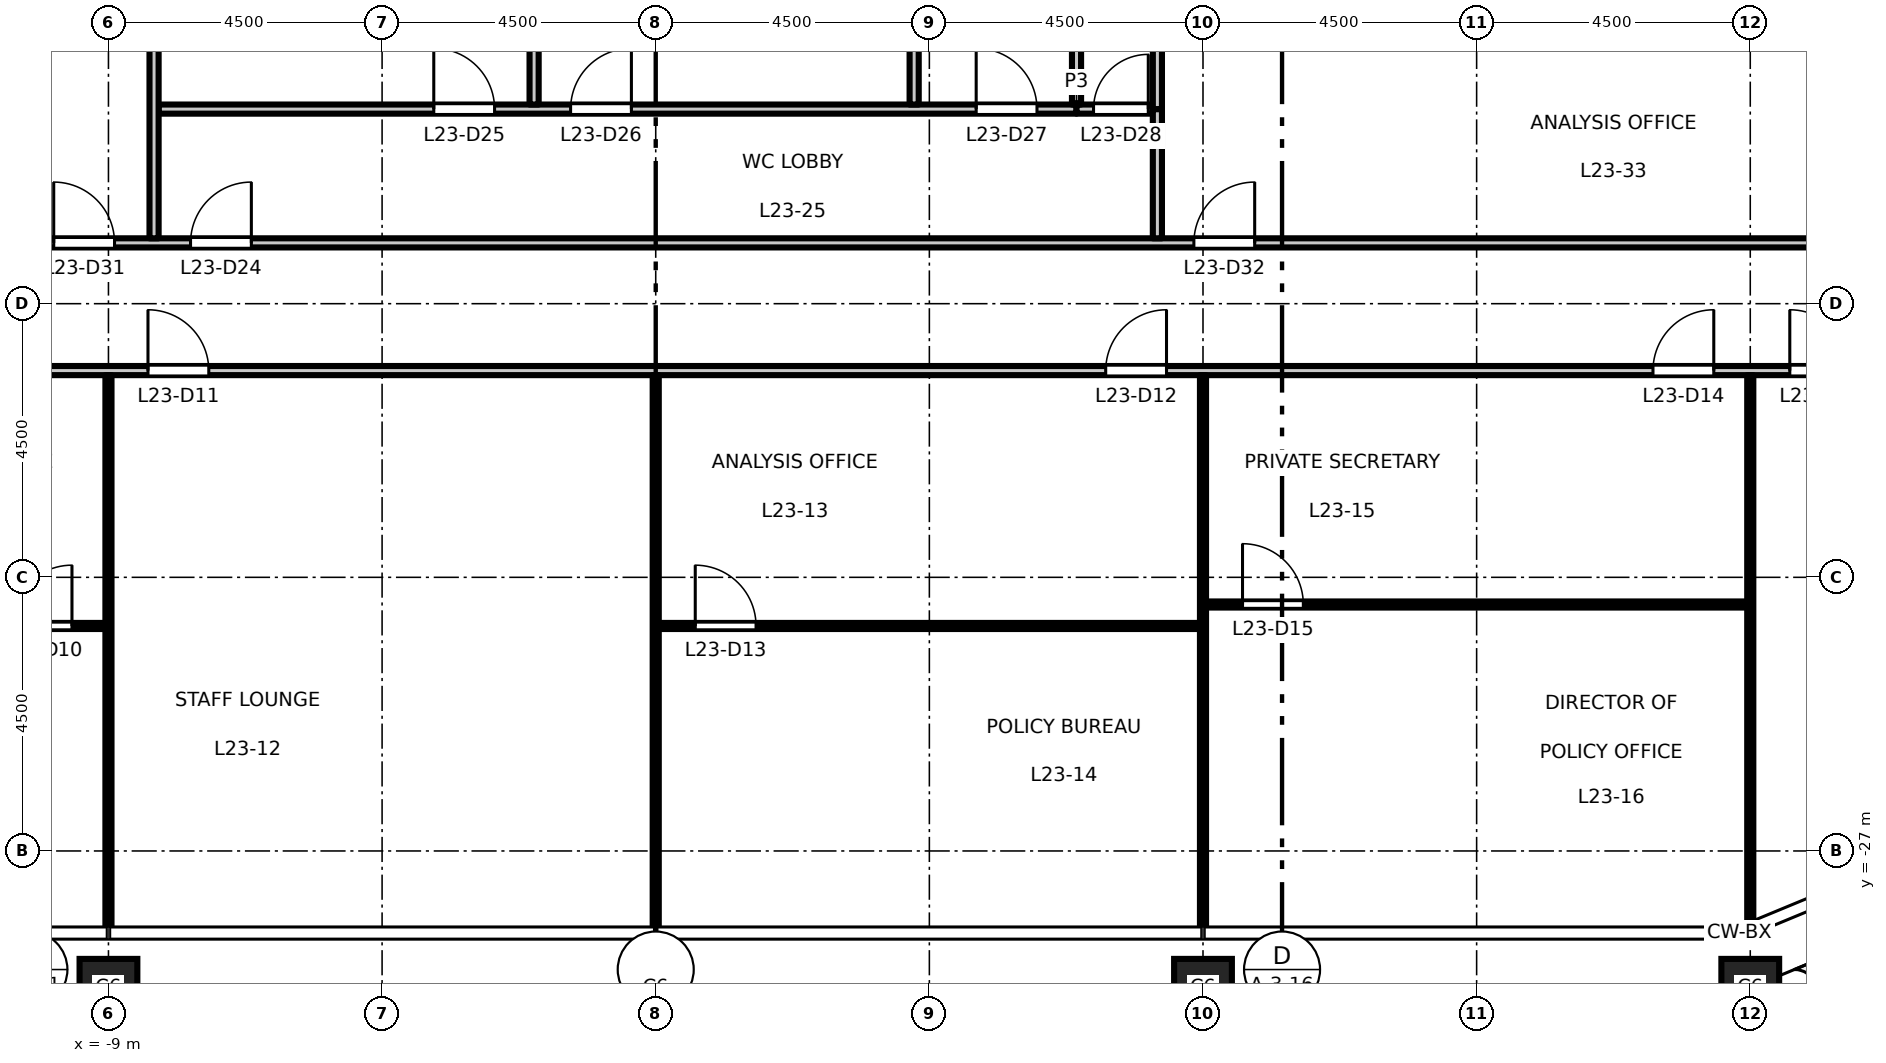
"""IFC4 building model, lengths in metres.
Left out: names, types, materials, properties, quantities, classifications, styles, units other than length and angle.
Written with IfcOpenShell. Run it as: python <this file> out.ifc"""

import sys

from ifc_helpers import new_model, si_unit, direction, frame, frame_2d, origin, origin_2d, place, context, subcontext, project, spatial, rectangle, hollow_rectangle, extrude, element, fill, save


model = new_model("IFC4")
c1 = context("Model", 3, precision=1e-05, world=origin(), true_north=direction((0.0, 1.0)))
c2 = subcontext(c1, "Body", "Model", "MODEL_VIEW")
j1 = project(units=[si_unit("LENGTHUNIT", "METRE"), si_unit("PLANEANGLEUNIT", "RADIAN")], contexts=[c1])
p1 = place(None, origin())
s1 = spatial("IfcSite", under=j1, at=p1, CompositionType="ELEMENT")
p2 = place(p1, origin())
s2 = spatial("IfcBuilding", under=s1, at=p2, CompositionType="ELEMENT")
p3 = place(p2, frame((0.0, 0.0, 109.2)))
s3 = spatial("IfcBuildingStorey", under=s2, at=p3, CompositionType="ELEMENT", Elevation=109.2)
for number, where, z_axis, x_axis in (
    (1, (-9.0, -29.25, 0.0), (0.0, 0.0, 1.0), (1.0, 0.0, 0.0)),
    (2, (0.0, -29.25, 0.0), (0.0, 0.0, 1.0), (1.0, 0.0, 0.0)),
    (3, (9.0, -29.25, 0.0), (0.0, 0.0, 1.0), (1.0, 0.0, 0.0)),
    (4, (18.0, -29.25, 0.0), (0.0, 0.0, 1.0), (1.0, 0.0, 0.0)),
):
    element("IfcColumn", number, at=place(p3, frame(where, z_axis=z_axis, x_axis=x_axis)), inside=s3, PredefinedType="COLUMN", context=c2, shape_type="SweptSolid", body=[
        extrude(hollow_rectangle(XDim=0.95, YDim=0.95, WallThickness=0.055, at=origin_2d()), origin(), (0.0, 0.0, 1.0), 4.5),
    ])
p4 = place(p3, frame((-17.95, -23.3, 0.0), z_axis=(0.0, 0.0, 1.0), x_axis=(1.0, 0.0, 0.0)))
e5 = element("IfcWall", 5, at=p4, inside=s3, PredefinedType="PARTITIONING", context=c2, shape_type="SweptSolid", body=[
    extrude(rectangle(XDim=8.9, YDim=0.1, at=frame_2d((4.45, 0.0))), origin(), (0.0, 0.0, 1.0), 4.35),
])
p5 = place(p4, frame((7.35, 0.0, 0.0)))
e6 = element("IfcOpeningElement", 6, at=p5, cuts=e5, PredefinedType="OPENING", context=c2, shape_type="SweptSolid", body=[
    extrude(rectangle(XDim=1.0, YDim=2.1, at=frame_2d((0.5, 1.05))), frame((0.0, 0.06, 0.0), z_axis=(0.0, -1.0, 0.0), x_axis=(1.0, 0.0, 0.0)), (0.0, 0.0, 1.0), 0.12),
])
p6 = place(p3, frame((0.05, -23.3, 0.0), z_axis=(0.0, 0.0, 1.0), x_axis=(1.0, 0.0, 0.0)))
e7 = element("IfcWall", 7, at=p6, inside=s3, PredefinedType="PARTITIONING", context=c2, shape_type="SweptSolid", body=[
    extrude(rectangle(XDim=8.9, YDim=0.1, at=frame_2d((4.45, 0.0))), origin(), (0.0, 0.0, 1.0), 4.35),
])
p7 = place(p6, frame((0.6, 0.0, 0.0)))
e8 = element("IfcOpeningElement", 8, at=p7, cuts=e7, PredefinedType="OPENING", context=c2, shape_type="SweptSolid", body=[
    extrude(rectangle(XDim=1.0, YDim=2.1, at=frame_2d((0.5, 1.05))), frame((0.0, 0.06, 0.0), z_axis=(0.0, -1.0, 0.0), x_axis=(1.0, 0.0, 0.0)), (0.0, 0.0, 1.0), 0.12),
])
p8 = place(p3, frame((9.05, -22.947, 0.0), z_axis=(0.0, 0.0, 1.0), x_axis=(1.0, 0.0, 0.0)))
e9 = element("IfcWall", 9, at=p8, inside=s3, PredefinedType="PARTITIONING", context=c2, shape_type="SweptSolid", body=[
    extrude(rectangle(XDim=8.9, YDim=0.1, at=frame_2d((4.45, 0.0))), origin(), (0.0, 0.0, 1.0), 4.35),
])
p9 = place(p8, frame((0.6, 0.0, 0.0)))
e10 = element("IfcOpeningElement", 10, at=p9, cuts=e9, PredefinedType="OPENING", context=c2, shape_type="SweptSolid", body=[
    extrude(rectangle(XDim=1.0, YDim=2.1, at=frame_2d((0.5, 1.05))), frame((0.0, 0.06, 0.0), z_axis=(0.0, -1.0, 0.0), x_axis=(1.0, 0.0, 0.0)), (0.0, 0.0, 1.0), 0.12),
])
p10 = place(p3, frame((-27.723, -19.1, 0.0), z_axis=(0.0, 0.0, 1.0), x_axis=(1.0, 0.0, 0.0)))
e11 = element("IfcWall", 11, at=p10, inside=s3, PredefinedType="PARTITIONING", context=c2, shape_type="SweptSolid", body=[
    extrude(rectangle(XDim=55.446, YDim=0.15, at=frame_2d((27.723, 0.0))), origin(), (0.0, 0.0, 1.0), 4.35),
])
p11 = place(p10, frame((10.373, 0.0, 0.0)))
e12 = element("IfcOpeningElement", 12, at=p11, cuts=e11, PredefinedType="OPENING", context=c2, shape_type="SweptSolid", body=[
    extrude(rectangle(XDim=1.0, YDim=2.1, at=frame_2d((0.5, 1.05))), frame((0.0, 0.085, 0.0), z_axis=(0.0, -1.0, 0.0), x_axis=(1.0, 0.0, 0.0)), (0.0, 0.0, 1.0), 0.17),
])
p12 = place(p10, frame((19.373, 0.0, 0.0)))
e13 = element("IfcOpeningElement", 13, at=p12, cuts=e11, PredefinedType="OPENING", context=c2, shape_type="SweptSolid", body=[
    extrude(rectangle(XDim=1.0, YDim=2.1, at=frame_2d((0.5, 1.05))), frame((0.0, 0.085, 0.0), z_axis=(0.0, -1.0, 0.0), x_axis=(1.0, 0.0, 0.0)), (0.0, 0.0, 1.0), 0.17),
])
p13 = place(p10, frame((35.123, 0.0, 0.0)))
e14 = element("IfcOpeningElement", 14, at=p13, cuts=e11, PredefinedType="OPENING", context=c2, shape_type="SweptSolid", body=[
    extrude(rectangle(XDim=1.0, YDim=2.1, at=frame_2d((0.5, 1.05))), frame((0.0, 0.085, 0.0), z_axis=(0.0, -1.0, 0.0), x_axis=(1.0, 0.0, 0.0)), (0.0, 0.0, 1.0), 0.17),
])
p14 = place(p10, frame((44.123, 0.0, 0.0)))
e15 = element("IfcOpeningElement", 15, at=p14, cuts=e11, PredefinedType="OPENING", context=c2, shape_type="SweptSolid", body=[
    extrude(rectangle(XDim=1.0, YDim=2.1, at=frame_2d((0.5, 1.05))), frame((0.0, 0.085, 0.0), z_axis=(0.0, -1.0, 0.0), x_axis=(1.0, 0.0, 0.0)), (0.0, 0.0, 1.0), 0.17),
])
p15 = place(p10, frame((0.65, 0.0, 0.0)))
e16 = element("IfcOpeningElement", 16, at=p15, cuts=e11, PredefinedType="OPENING", context=c2, shape_type="SweptSolid", body=[
    extrude(rectangle(XDim=1.0, YDim=2.1, at=frame_2d((0.5, 1.05))), frame((0.0, 0.085, 0.0), z_axis=(0.0, -1.0, 0.0), x_axis=(1.0, 0.0, 0.0)), (0.0, 0.0, 1.0), 0.17),
])
p16 = place(p10, frame((46.373, 0.0, 0.0)))
e17 = element("IfcOpeningElement", 17, at=p16, cuts=e11, PredefinedType="OPENING", context=c2, shape_type="SweptSolid", body=[
    extrude(rectangle(XDim=1.0, YDim=2.1, at=frame_2d((0.5, 1.05))), frame((0.0, 0.085, 0.0), z_axis=(0.0, -1.0, 0.0), x_axis=(1.0, 0.0, 0.0)), (0.0, 0.0, 1.0), 0.17),
])
p17 = place(p3, frame((-21.825, -17.0, 0.0), z_axis=(0.0, 0.0, 1.0), x_axis=(1.0, 0.0, 0.0)))
e18 = element("IfcWall", 18, at=p17, inside=s3, PredefinedType="PARTITIONING", context=c2, shape_type="SweptSolid", body=[
    extrude(rectangle(XDim=43.65, YDim=0.15, at=frame_2d((21.825, 0.0))), origin(), (0.0, 0.0, 1.0), 4.35),
])
p18 = place(p17, frame((14.175, 0.0, 0.0)))
e19 = element("IfcOpeningElement", 19, at=p18, cuts=e18, PredefinedType="OPENING", context=c2, shape_type="SweptSolid", body=[
    extrude(rectangle(XDim=1.0, YDim=2.1, at=frame_2d((0.5, 1.05))), frame((0.0, 0.085, 0.0), z_axis=(0.0, -1.0, 0.0), x_axis=(1.0, 0.0, 0.0)), (0.0, 0.0, 1.0), 0.17),
])
p19 = place(p17, frame((11.925, 0.0, 0.0)))
e20 = element("IfcOpeningElement", 20, at=p19, cuts=e18, PredefinedType="OPENING", context=c2, shape_type="SweptSolid", body=[
    extrude(rectangle(XDim=1.0, YDim=2.1, at=frame_2d((0.5, 1.05))), frame((0.0, 0.085, 0.0), z_axis=(0.0, -1.0, 0.0), x_axis=(1.0, 0.0, 0.0)), (0.0, 0.0, 1.0), 0.17),
])
p20 = place(p17, frame((30.675, 0.0, 0.0)))
e21 = element("IfcOpeningElement", 21, at=p20, cuts=e18, PredefinedType="OPENING", context=c2, shape_type="SweptSolid", body=[
    extrude(rectangle(XDim=1.0, YDim=2.1, at=frame_2d((0.5, 1.05))), frame((0.0, 0.085, 0.0), z_axis=(0.0, -1.0, 0.0), x_axis=(1.0, 0.0, 0.0)), (0.0, 0.0, 1.0), 0.17),
])
p21 = place(p3, frame((-8.175, -14.8, 0.0), z_axis=(0.0, 0.0, 1.0), x_axis=(1.0, 0.0, 0.0)))
e22 = element("IfcWall", 22, at=p21, inside=s3, PredefinedType="PARTITIONING", context=c2, shape_type="SweptSolid", body=[
    extrude(rectangle(XDim=15.095, YDim=0.15, at=frame_2d((7.547, 0.0))), origin(), (0.0, 0.0, 1.0), 4.35),
])
p22 = place(p21, frame((4.525, 0.0, 0.0)))
e23 = element("IfcOpeningElement", 23, at=p22, cuts=e22, PredefinedType="OPENING", context=c2, shape_type="SweptSolid", body=[
    extrude(rectangle(XDim=1.0, YDim=2.1, at=frame_2d((0.5, 1.05))), frame((0.0, 0.085, 0.0), z_axis=(0.0, -1.0, 0.0), x_axis=(1.0, 0.0, 0.0)), (0.0, 0.0, 1.0), 0.17),
])
p23 = place(p21, frame((6.775, 0.0, 0.0)))
e24 = element("IfcOpeningElement", 24, at=p23, cuts=e22, PredefinedType="OPENING", context=c2, shape_type="SweptSolid", body=[
    extrude(rectangle(XDim=1.0, YDim=2.1, at=frame_2d((0.5, 1.05))), frame((0.0, 0.085, 0.0), z_axis=(0.0, -1.0, 0.0), x_axis=(1.0, 0.0, 0.0)), (0.0, 0.0, 1.0), 0.17),
])
p24 = place(p21, frame((13.445, 0.0, 0.0)))
e25 = element("IfcOpeningElement", 25, at=p24, cuts=e22, PredefinedType="OPENING", context=c2, shape_type="SweptSolid", body=[
    extrude(rectangle(XDim=1.0, YDim=2.1, at=frame_2d((0.5, 1.05))), frame((0.0, 0.085, 0.0), z_axis=(0.0, -1.0, 0.0), x_axis=(1.0, 0.0, 0.0)), (0.0, 0.0, 1.0), 0.17),
])
p25 = place(p3, frame((6.92, -14.8, 0.0), z_axis=(0.0, 0.0, 1.0), x_axis=(1.0, 0.0, 0.0)))
e26 = element("IfcWall", 26, at=p25, inside=s3, PredefinedType="PARTITIONING", context=c2, shape_type="SweptSolid", body=[
    extrude(rectangle(XDim=1.255, YDim=0.15, at=frame_2d((0.627, 0.0))), origin(), (0.0, 0.0, 1.0), 4.35),
])
p26 = place(p25, frame((0.28, 0.0, 0.0)))
e27 = element("IfcOpeningElement", 27, at=p26, cuts=e26, PredefinedType="OPENING", context=c2, shape_type="SweptSolid", body=[
    extrude(rectangle(XDim=0.9, YDim=2.1, at=frame_2d((0.45, 1.05))), frame((0.0, 0.085, 0.0), z_axis=(0.0, -1.0, 0.0), x_axis=(1.0, 0.0, 0.0)), (0.0, 0.0, 1.0), 0.17),
])
p27 = place(p3, frame((-9.0, -28.26, 0.0), z_axis=(0.0, 0.0, 1.0), x_axis=(0.0, 1.0, 0.0)))
e28 = element("IfcWall", 28, at=p27, inside=s3, PredefinedType="PARTITIONING", context=c2, shape_type="SweptSolid", body=[
    extrude(rectangle(XDim=9.085, YDim=0.1, at=frame_2d((4.542, 0.0))), origin(), (0.0, 0.0, 1.0), 3.45),
])
p28 = place(p3, frame((-8.25, -16.925, 0.0), z_axis=(0.0, 0.0, 1.0), x_axis=(0.0, 1.0, 0.0)))
e29 = element("IfcWall", 29, at=p28, inside=s3, PredefinedType="PARTITIONING", context=c2, shape_type="SweptSolid", body=[
    extrude(rectangle(XDim=3.425, YDim=0.15, at=frame_2d((1.712, 0.0))), origin(), (0.0, 0.0, 1.0), 4.35),
])
p29 = place(p3, frame((-2.0, -14.725, 0.0), z_axis=(0.0, 0.0, 1.0), x_axis=(0.0, 1.0, 0.0)))
e30 = element("IfcWall", 30, at=p29, inside=s3, PredefinedType="PARTITIONING", context=c2, shape_type="SweptSolid", body=[
    extrude(rectangle(XDim=6.355, YDim=0.15, at=frame_2d((3.177, 0.0))), origin(), (0.0, 0.0, 1.0), 4.35),
])
p30 = place(p3, frame((0.0, -28.26, 0.0), z_axis=(0.0, 0.0, 1.0), x_axis=(0.0, 1.0, 0.0)))
e31 = element("IfcWall", 31, at=p30, inside=s3, PredefinedType="PARTITIONING", context=c2, shape_type="SweptSolid", body=[
    extrude(rectangle(XDim=9.085, YDim=0.1, at=frame_2d((4.542, 0.0))), origin(), (0.0, 0.0, 1.0), 3.45),
])
p31 = place(p3, frame((4.25, -14.725, 0.0), z_axis=(0.0, 0.0, 1.0), x_axis=(0.0, 1.0, 0.0)))
e32 = element("IfcWall", 32, at=p31, inside=s3, PredefinedType="PARTITIONING", context=c2, shape_type="SweptSolid", body=[
    extrude(rectangle(XDim=6.355, YDim=0.15, at=frame_2d((3.177, 0.0))), origin(), (0.0, 0.0, 1.0), 4.35),
])
p32 = place(p3, frame((6.92, -14.725, 0.0), z_axis=(0.0, 0.0, 1.0), x_axis=(0.0, 1.0, 0.0)))
e33 = element("IfcWall", 33, at=p32, inside=s3, PredefinedType="PARTITIONING", context=c2, shape_type="SweptSolid", body=[
    extrude(rectangle(XDim=6.7, YDim=0.15, at=frame_2d((3.35, 0.0))), origin(), (0.0, 0.0, 1.0), 4.35),
])
p33 = place(p3, frame((8.25, -16.925, 0.0), z_axis=(0.0, 0.0, 1.0), x_axis=(0.0, 1.0, 0.0)))
e34 = element("IfcWall", 34, at=p33, inside=s3, PredefinedType="PARTITIONING", context=c2, shape_type="SweptSolid", body=[
    extrude(rectangle(XDim=2.125, YDim=0.15, at=frame_2d((1.062, 0.0))), origin(), (0.0, 0.0, 1.0), 4.35),
])
p34 = place(p3, frame((8.25, -14.8, 0.0), z_axis=(0.0, 0.0, 1.0), x_axis=(0.0, 1.0, 0.0)))
e35 = element("IfcWall", 35, at=p34, inside=s3, PredefinedType="PARTITIONING", context=c2, shape_type="SweptSolid", body=[
    extrude(rectangle(XDim=1.3, YDim=0.15, at=frame_2d((0.65, 0.0))), origin(), (0.0, 0.0, 1.0), 4.35),
])
p35 = place(p3, frame((9.0, -28.26, 0.0), z_axis=(0.0, 0.0, 1.0), x_axis=(0.0, 1.0, 0.0)))
e36 = element("IfcWall", 36, at=p35, inside=s3, PredefinedType="PARTITIONING", context=c2, shape_type="SweptSolid", body=[
    extrude(rectangle(XDim=9.085, YDim=0.1, at=frame_2d((4.542, 0.0))), origin(), (0.0, 0.0, 1.0), 3.45),
])
p36 = place(p3, frame((18.0, -28.178, 0.0), z_axis=(0.0, 0.0, 1.0), x_axis=(0.0, 1.0, 0.0)))
e37 = element("IfcWall", 37, at=p36, inside=s3, PredefinedType="PARTITIONING", context=c2, shape_type="SweptSolid", body=[
    extrude(rectangle(XDim=9.003, YDim=0.1, at=frame_2d((4.501, 0.0))), origin(), (0.0, 0.0, 1.0), 3.45),
])
p37 = place(p5, origin())
e38 = element("IfcDoor", 38, at=p37, inside=s3, OperationType="SINGLE_SWING_RIGHT", PredefinedType="DOOR", context=c2, shape_type="SweptSolid", body=[
    extrude(rectangle(XDim=1.0, YDim=2.1, at=frame_2d((0.5, 1.05))), frame((0.0, 0.025, 0.0), z_axis=(0.0, -1.0, 0.0), x_axis=(1.0, 0.0, 0.0)), (0.0, 0.0, 1.0), 0.05),
])
fill(e6, e38)
p38 = place(p12, origin())
e39 = element("IfcDoor", 39, at=p38, inside=s3, OperationType="SINGLE_SWING_LEFT", PredefinedType="DOOR", context=c2, shape_type="SweptSolid", body=[
    extrude(rectangle(XDim=1.0, YDim=2.1, at=frame_2d((0.5, 1.05))), frame((0.0, 0.025, 0.0), z_axis=(0.0, -1.0, 0.0), x_axis=(1.0, 0.0, 0.0)), (0.0, 0.0, 1.0), 0.05),
])
fill(e13, e39)
p39 = place(p13, origin())
e40 = element("IfcDoor", 40, at=p39, inside=s3, OperationType="SINGLE_SWING_RIGHT", PredefinedType="DOOR", context=c2, shape_type="SweptSolid", body=[
    extrude(rectangle(XDim=1.0, YDim=2.1, at=frame_2d((0.5, 1.05))), frame((0.0, 0.025, 0.0), z_axis=(0.0, -1.0, 0.0), x_axis=(1.0, 0.0, 0.0)), (0.0, 0.0, 1.0), 0.05),
])
fill(e14, e40)
p40 = place(p7, origin())
e41 = element("IfcDoor", 41, at=p40, inside=s3, OperationType="SINGLE_SWING_LEFT", PredefinedType="DOOR", context=c2, shape_type="SweptSolid", body=[
    extrude(rectangle(XDim=1.0, YDim=2.1, at=frame_2d((0.5, 1.05))), frame((0.0, 0.025, 0.0), z_axis=(0.0, -1.0, 0.0), x_axis=(1.0, 0.0, 0.0)), (0.0, 0.0, 1.0), 0.05),
])
fill(e8, e41)
p41 = place(p14, origin())
e42 = element("IfcDoor", 42, at=p41, inside=s3, OperationType="SINGLE_SWING_RIGHT", PredefinedType="DOOR", context=c2, shape_type="SweptSolid", body=[
    extrude(rectangle(XDim=1.0, YDim=2.1, at=frame_2d((0.5, 1.05))), frame((0.0, 0.025, 0.0), z_axis=(0.0, -1.0, 0.0), x_axis=(1.0, 0.0, 0.0)), (0.0, 0.0, 1.0), 0.05),
])
fill(e15, e42)
p42 = place(p9, origin())
e43 = element("IfcDoor", 43, at=p42, inside=s3, OperationType="SINGLE_SWING_LEFT", PredefinedType="DOOR", context=c2, shape_type="SweptSolid", body=[
    extrude(rectangle(XDim=1.0, YDim=2.1, at=frame_2d((0.5, 1.05))), frame((0.0, 0.025, 0.0), z_axis=(0.0, -1.0, 0.0), x_axis=(1.0, 0.0, 0.0)), (0.0, 0.0, 1.0), 0.05),
])
fill(e10, e43)
p43 = place(p16, origin())
e44 = element("IfcDoor", 44, at=p43, inside=s3, OperationType="SINGLE_SWING_LEFT", PredefinedType="DOOR", context=c2, shape_type="SweptSolid", body=[
    extrude(rectangle(XDim=1.0, YDim=2.1, at=frame_2d((0.5, 1.05))), frame((0.0, 0.025, 0.0), z_axis=(0.0, -1.0, 0.0), x_axis=(1.0, 0.0, 0.0)), (0.0, 0.0, 1.0), 0.05),
])
fill(e17, e44)
p44 = place(p18, origin())
e45 = element("IfcDoor", 45, at=p44, inside=s3, OperationType="SINGLE_SWING_RIGHT", PredefinedType="DOOR", context=c2, shape_type="SweptSolid", body=[
    extrude(rectangle(XDim=1.0, YDim=2.1, at=frame_2d((0.5, 1.05))), frame((0.0, 0.025, 0.0), z_axis=(0.0, -1.0, 0.0), x_axis=(1.0, 0.0, 0.0)), (0.0, 0.0, 1.0), 0.05),
])
fill(e19, e45)
p45 = place(p22, origin())
e46 = element("IfcDoor", 46, at=p45, inside=s3, OperationType="SINGLE_SWING_LEFT", PredefinedType="DOOR", context=c2, shape_type="SweptSolid", body=[
    extrude(rectangle(XDim=1.0, YDim=2.1, at=frame_2d((0.5, 1.05))), frame((0.0, 0.025, 0.0), z_axis=(0.0, -1.0, 0.0), x_axis=(1.0, 0.0, 0.0)), (0.0, 0.0, 1.0), 0.05),
])
fill(e23, e46)
p46 = place(p23, origin())
e47 = element("IfcDoor", 47, at=p46, inside=s3, OperationType="SINGLE_SWING_RIGHT", PredefinedType="DOOR", context=c2, shape_type="SweptSolid", body=[
    extrude(rectangle(XDim=1.0, YDim=2.1, at=frame_2d((0.5, 1.05))), frame((0.0, 0.025, 0.0), z_axis=(0.0, -1.0, 0.0), x_axis=(1.0, 0.0, 0.0)), (0.0, 0.0, 1.0), 0.05),
])
fill(e24, e47)
p47 = place(p24, origin())
e48 = element("IfcDoor", 48, at=p47, inside=s3, OperationType="SINGLE_SWING_LEFT", PredefinedType="DOOR", context=c2, shape_type="SweptSolid", body=[
    extrude(rectangle(XDim=1.0, YDim=2.1, at=frame_2d((0.5, 1.05))), frame((0.0, 0.025, 0.0), z_axis=(0.0, -1.0, 0.0), x_axis=(1.0, 0.0, 0.0)), (0.0, 0.0, 1.0), 0.05),
])
fill(e25, e48)
p48 = place(p26, origin())
e49 = element("IfcDoor", 49, at=p48, inside=s3, OperationType="SINGLE_SWING_RIGHT", PredefinedType="DOOR", context=c2, shape_type="SweptSolid", body=[
    extrude(rectangle(XDim=0.9, YDim=2.1, at=frame_2d((0.45, 1.05))), frame((0.0, 0.025, 0.0), z_axis=(0.0, -1.0, 0.0), x_axis=(1.0, 0.0, 0.0)), (0.0, 0.0, 1.0), 0.05),
])
fill(e27, e49)
p49 = place(p19, origin())
e50 = element("IfcDoor", 50, at=p49, inside=s3, OperationType="SINGLE_SWING_LEFT", PredefinedType="DOOR", context=c2, shape_type="SweptSolid", body=[
    extrude(rectangle(XDim=1.0, YDim=2.1, at=frame_2d((0.5, 1.05))), frame((0.0, 0.025, 0.0), z_axis=(0.0, -1.0, 0.0), x_axis=(1.0, 0.0, 0.0)), (0.0, 0.0, 1.0), 0.05),
])
fill(e20, e50)
p50 = place(p20, origin())
e51 = element("IfcDoor", 51, at=p50, inside=s3, OperationType="SINGLE_SWING_RIGHT", PredefinedType="DOOR", context=c2, shape_type="SweptSolid", body=[
    extrude(rectangle(XDim=1.0, YDim=2.1, at=frame_2d((0.5, 1.05))), frame((0.0, 0.025, 0.0), z_axis=(0.0, -1.0, 0.0), x_axis=(1.0, 0.0, 0.0)), (0.0, 0.0, 1.0), 0.05),
])
fill(e21, e51)
save(model, sys.argv[1])
